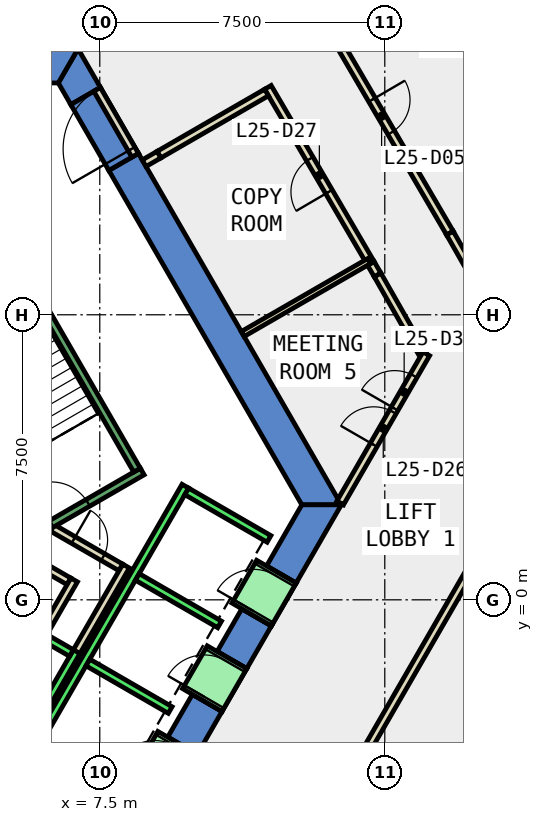
"""IFC4 building model, lengths in metres.
Left out: names, types, materials, properties, quantities, classifications, styles, units other than length and angle.
Written with IfcOpenShell. Run it as: python <this file> out.ifc"""

import sys

from ifc_helpers import new_model, si_unit, direction, frame, frame_2d, origin, place, context, subcontext, project, spatial, polyline, rectangle, outline, extrude, element, fill, save


model = new_model("IFC4")
c1 = context("Model", 3, precision=1e-05, world=origin(), true_north=direction((0.0, 1.0)))
c2 = subcontext(c1, "Body", "Model", "MODEL_VIEW")
j1 = project(units=[si_unit("LENGTHUNIT", "METRE"), si_unit("PLANEANGLEUNIT", "RADIAN")], contexts=[c1])
p1 = place(None, origin())
s1 = spatial("IfcSite", under=j1, at=p1, CompositionType="ELEMENT")
p2 = place(p1, origin())
s2 = spatial("IfcBuilding", under=s1, at=p2, CompositionType="ELEMENT")
p3 = place(p2, frame((0.0, 0.0, 116.0)))
s3 = spatial("IfcBuildingStorey", under=s2, at=p3, CompositionType="ELEMENT", Elevation=116.0)
p4 = place(p3, frame((0.0, 0.0, -0.4)))
e1 = element("IfcWall", 1, at=p4, inside=s3, PredefinedType="SHEAR", context=c2, shape_type="SweptSolid", body=[
    extrude(outline(polyline([(8.517, 11.748), (7.738, 11.298), (12.817, 2.5), (13.856, 2.5), (8.517, 11.748)])), origin(), (0.0, 0.0, 1.0), 4.2),
])
p5 = place(p3, frame((0.0, 0.0, -0.4)))
e2 = element("IfcWall", 2, at=p5, inside=s3, PredefinedType="SHEAR", context=c2, shape_type="SweptSolid", body=[
    extrude(outline(polyline([(6.738, 13.03), (7.517, 13.48), (6.928, 14.5), (6.409, 13.6), (6.738, 13.03)])), origin(), (0.0, 0.0, 1.0), 4.2),
])
p6 = place(p3, frame((0.0, 0.0, 3.6)))
e3 = element("IfcWall", 3, at=p6, inside=s3, PredefinedType="SHEAR", context=c2, shape_type="SweptSolid", body=[
    extrude(outline(polyline([(7.517, 13.48), (6.738, 13.03), (7.738, 11.298), (8.517, 11.748), (7.517, 13.48)])), origin(), (0.0, 0.0, 1.0), 0.2),
])
p7 = place(p3, frame((0.0, 0.0, -0.4)))
e4 = element("IfcWall", 4, at=p7, inside=s3, PredefinedType="SHEAR", context=c2, shape_type="SweptSolid", body=[
    extrude(outline(polyline([(4.55, 14.5), (4.55, 13.6), (6.409, 13.6), (6.928, 14.5), (4.55, 14.5)])), origin(), (0.0, 0.0, 1.0), 4.2),
])
p8 = place(p3, frame((0.0, 0.0, -0.4)))
e5 = element("IfcWall", 5, at=p8, inside=s3, PredefinedType="SHEAR", context=c2, shape_type="SweptSolid", body=[
    extrude(outline(polyline([(10.717, -2.937), (9.938, -2.487), (9.288, -3.613), (10.067, -4.063), (10.717, -2.937)])), origin(), (0.0, 0.0, 1.0), 4.2),
])
p9 = place(p3, frame((0.0, 0.0, -0.4)))
e6 = element("IfcWall", 6, at=p9, inside=s3, PredefinedType="SHEAR", context=c2, shape_type="SweptSolid", body=[
    extrude(outline(polyline([(12.017, -0.686), (11.238, -0.236), (10.588, -1.361), (11.367, -1.811), (12.017, -0.686)])), origin(), (0.0, 0.0, 1.0), 4.2),
])
p10 = place(p3, frame((0.0, 0.0, -0.4)))
e7 = element("IfcWall", 7, at=p10, inside=s3, PredefinedType="SHEAR", context=c2, shape_type="SweptSolid", body=[
    extrude(outline(polyline([(11.888, 0.89), (12.667, 0.44), (13.856, 2.5), (12.817, 2.5), (11.888, 0.89)])), origin(), (0.0, 0.0, 1.0), 4.2),
])
p11 = place(p3, frame((0.0, 0.0, 3.6)))
e8 = element("IfcWall", 8, at=p11, inside=s3, PredefinedType="SHEAR", context=c2, shape_type="SweptSolid", body=[
    extrude(outline(polyline([(10.067, -4.063), (9.288, -3.613), (8.638, -4.739), (9.417, -5.189), (10.067, -4.063)])), origin(), (0.0, 0.0, 1.0), 0.2),
])
p12 = place(p3, frame((0.0, 0.0, 3.6)))
e9 = element("IfcWall", 9, at=p12, inside=s3, PredefinedType="SHEAR", context=c2, shape_type="SweptSolid", body=[
    extrude(outline(polyline([(11.367, -1.811), (10.588, -1.361), (9.938, -2.487), (10.717, -2.937), (11.367, -1.811)])), origin(), (0.0, 0.0, 1.0), 0.2),
])
p13 = place(p3, frame((0.0, 0.0, 3.6)))
e10 = element("IfcWall", 10, at=p13, inside=s3, PredefinedType="SHEAR", context=c2, shape_type="SweptSolid", body=[
    extrude(outline(polyline([(12.667, 0.44), (11.888, 0.89), (11.238, -0.236), (12.017, -0.686), (12.667, 0.44)])), origin(), (0.0, 0.0, 1.0), 0.2),
])
p14 = place(p3, frame((15.993, 6.473, 0.0), z_axis=(0.0, 0.0, 1.0), x_axis=(-0.495159881733, 0.86880187127, 0.0)))
e11 = element("IfcWall", 11, at=p14, inside=s3, PredefinedType="PARTITIONING", context=c2, shape_type="SweptSolid", body=[
    extrude(rectangle(XDim=2.391, YDim=0.2, at=frame_2d((1.195, 0.0))), origin(), (0.0, 0.0, 1.0), 3.8),
])
p15 = place(p3, frame((14.809, 8.55, 0.0), z_axis=(0.0, 0.0, 1.0), x_axis=(-0.50443330283, 0.86345066043, 0.0)))
e12 = element("IfcWall", 12, at=p15, inside=s3, PredefinedType="PARTITIONING", context=c2, shape_type="SweptSolid", body=[
    extrude(rectangle(XDim=0.351, YDim=0.2, at=frame_2d((0.175, 0.0))), origin(), (0.0, 0.0, 1.0), 3.8),
])
p16 = place(p3, frame((14.632, 8.853, 0.0), z_axis=(0.0, 0.0, 1.0), x_axis=(-0.504798859257, 0.863236996249, 0.0)))
e13 = element("IfcWall", 13, at=p16, inside=s3, PredefinedType="PARTITIONING", context=c2, shape_type="SweptSolid", body=[
    extrude(rectangle(XDim=5.365, YDim=0.2, at=frame_2d((2.682, 0.0))), origin(), (0.0, 0.0, 1.0), 3.8),
])
p17 = place(p16, frame((2.182, 0.0, 0.0)))
e14 = element("IfcOpeningElement", 14, at=p17, cuts=e13, PredefinedType="OPENING", context=c2, shape_type="SweptSolid", body=[
    extrude(rectangle(XDim=1.0, YDim=2.1, at=frame_2d((0.5, 1.05))), frame((0.0, 0.11, 0.0), z_axis=(0.0, -1.0, 0.0), x_axis=(1.0, 0.0, 0.0)), (0.0, 0.0, 1.0), 0.22),
])
p18 = place(p3, frame((11.888, 13.348, 0.0), z_axis=(0.0, 0.0, 1.0), x_axis=(-0.865959227195, -0.500114603702, 0.0)))
e15 = element("IfcWall", 15, at=p18, inside=s3, PredefinedType="PARTITIONING", context=c2, shape_type="SweptSolid", body=[
    extrude(rectangle(XDim=3.269, YDim=0.2, at=frame_2d((1.635, 0.0))), origin(), (0.0, 0.0, 1.0), 3.8),
])
p19 = place(p3, frame((13.119, 15.799, 0.0), z_axis=(0.0, 0.0, 1.0), x_axis=(0.504729598075, -0.863277494684, 0.0)))
e16 = element("IfcWall", 16, at=p19, inside=s3, PredefinedType="PARTITIONING", context=c2, shape_type="SweptSolid", body=[
    extrude(rectangle(XDim=7.123, YDim=0.2, at=frame_2d((3.562, 0.0))), origin(), (0.0, 0.0, 1.0), 3.8),
])
p20 = place(p19, frame((3.061, 0.0, 0.0)))
e17 = element("IfcOpeningElement", 17, at=p20, cuts=e16, PredefinedType="OPENING", context=c2, shape_type="SweptSolid", body=[
    extrude(rectangle(XDim=1.0, YDim=2.1, at=frame_2d((0.5, 1.05))), frame((0.0, 0.11, 0.0), z_axis=(0.0, -1.0, 0.0), x_axis=(1.0, 0.0, 0.0)), (0.0, 0.0, 1.0), 0.22),
])
p21 = place(p3, frame((16.714, 9.65, 0.0), z_axis=(0.0, 0.0, 1.0), x_axis=(0.495286549488, -0.868729666753, 0.0)))
e18 = element("IfcWall", 18, at=p21, inside=s3, PredefinedType="PARTITIONING", context=c2, shape_type="SweptSolid", body=[
    extrude(rectangle(XDim=3.487, YDim=0.2, at=frame_2d((1.743, 0.0))), origin(), (0.0, 0.0, 1.0), 3.8),
])
p22 = place(p3, frame((5.499, 1.172, 0.0), z_axis=(0.0, 0.0, 1.0), x_axis=(0.866333505267, -0.499465972466, 0.0)))
e19 = element("IfcWall", 19, at=p22, inside=s3, PredefinedType="PARTITIONING", context=c2, shape_type="SweptSolid", body=[
    extrude(rectangle(XDim=1.374, YDim=0.2, at=frame_2d((0.687, 0.0))), origin(), (0.0, 0.0, 1.0), 3.8),
])
p23 = place(p3, frame((6.826, 0.522, 0.0), z_axis=(0.0, 0.0, 1.0), x_axis=(-0.500016722714, -0.866015748706, 0.0)))
e20 = element("IfcWall", 20, at=p23, inside=s3, PredefinedType="PARTITIONING", context=c2, shape_type="SweptSolid", body=[
    extrude(rectangle(XDim=1.7, YDim=0.2, at=frame_2d((0.85, 0.0))), origin(), (0.0, 0.0, 1.0), 3.8),
])
p24 = place(p3, frame((6.25, 1.894, 0.0), z_axis=(0.0, 0.0, 1.0), x_axis=(0.866043184279, -0.499969202016, 0.0)))
e21 = element("IfcWall", 21, at=p24, inside=s3, PredefinedType="PARTITIONING", context=c2, shape_type="SweptSolid", body=[
    extrude(rectangle(XDim=2.084, YDim=0.2, at=frame_2d((1.042, 0.0))), origin(), (0.0, 0.0, 1.0), 3.8),
])
p25 = place(p24, frame((0.642, 0.0, 0.0)))
e22 = element("IfcOpeningElement", 22, at=p25, cuts=e21, PredefinedType="OPENING", context=c2, shape_type="SweptSolid", body=[
    extrude(rectangle(XDim=0.9, YDim=2.1, at=frame_2d((0.45, 1.05))), frame((0.0, 0.11, 0.0), z_axis=(0.0, -1.0, 0.0), x_axis=(1.0, 0.0, 0.0)), (0.0, 0.0, 1.0), 0.22),
])
p26 = place(p3, frame((8.192, 0.888, 0.0), z_axis=(0.0, 0.0, 1.0), x_axis=(-0.499940625693, -0.866059680843, 0.0)))
e23 = element("IfcWall", 23, at=p26, inside=s3, PredefinedType="PARTITIONING", context=c2, shape_type="SweptSolid", body=[
    extrude(rectangle(XDim=2.68, YDim=0.2, at=frame_2d((1.34, 0.0))), origin(), (0.0, 0.0, 1.0), 3.8),
])
p27 = place(p3, frame((11.261, 6.994, 0.0), z_axis=(0.0, 0.0, 1.0), x_axis=(0.86605248387, 0.499953092981, 0.0)))
e24 = element("IfcWall", 24, at=p27, inside=s3, PredefinedType="PARTITIONING", context=c2, shape_type="SweptSolid", body=[
    extrude(rectangle(XDim=3.848, YDim=0.15, at=frame_2d((1.924, 0.0))), origin(), (0.0, 0.0, 1.0), 3.8),
])
p28 = place(p3, frame((13.827, 2.55, 0.0), z_axis=(0.0, 0.0, 1.0), x_axis=(0.500045913515, 0.865998893981, 0.0)))
e25 = element("IfcWall", 25, at=p28, inside=s3, PredefinedType="PARTITIONING", context=c2, shape_type="SweptSolid", body=[
    extrude(rectangle(XDim=4.53, YDim=0.2, at=frame_2d((2.265, 0.0))), origin(), (0.0, 0.0, 1.0), 3.8),
])
p29 = place(p28, frame((1.765, 0.0, 0.0)))
e26 = element("IfcOpeningElement", 26, at=p29, cuts=e25, PredefinedType="OPENING", context=c2, shape_type="SweptSolid", body=[
    extrude(rectangle(XDim=1.0, YDim=2.1, at=frame_2d((0.5, 1.05))), frame((0.0, 0.11, 0.0), z_axis=(0.0, -1.0, 0.0), x_axis=(1.0, 0.0, 0.0)), (0.0, 0.0, 1.0), 0.22),
])
p30 = place(p28, frame((2.865, 0.0, 0.0)))
e27 = element("IfcOpeningElement", 27, at=p30, cuts=e25, PredefinedType="OPENING", context=c2, shape_type="SweptSolid", body=[
    extrude(rectangle(XDim=1.0, YDim=2.1, at=frame_2d((0.5, 1.05))), frame((0.0, 0.11, 0.0), z_axis=(0.0, -1.0, 0.0), x_axis=(1.0, 0.0, 0.0)), (0.0, 0.0, 1.0), 0.22),
])
p31 = place(p3, frame((18.301, 2.598, 0.0), z_axis=(0.0, 0.0, 1.0), x_axis=(-0.49997732567, -0.866038494419, 0.0)))
e28 = element("IfcWall", 28, at=p31, inside=s3, PredefinedType="PARTITIONING", context=c2, shape_type="SweptSolid", body=[
    extrude(rectangle(XDim=11.0, YDim=0.2, at=frame_2d((5.5, 0.0))), origin(), (0.0, 0.0, 1.0), 3.8),
])
p32 = place(p3, frame((8.43, 11.698, 0.0), z_axis=(0.0, 0.0, 1.0), x_axis=(-0.50002537861, 0.866010750942, 0.0)))
e29 = element("IfcWall", 29, at=p32, inside=s3, PredefinedType="PARTITIONING", context=c2, shape_type="SweptSolid", body=[
    extrude(rectangle(XDim=2.0, YDim=0.2, at=frame_2d((1.0, 0.0))), origin(), (0.0, 0.0, 1.0), 2.4),
])
p33 = place(p32, frame((0.19, 0.0, 0.0)))
e30 = element("IfcOpeningElement", 30, at=p33, cuts=e29, PredefinedType="OPENING", context=c2, shape_type="SweptSolid", body=[
    extrude(rectangle(XDim=1.8, YDim=2.1, at=frame_2d((0.9, 1.05))), frame((0.0, 0.11, 0.0), z_axis=(0.0, -1.0, 0.0), x_axis=(1.0, 0.0, 0.0)), (0.0, 0.0, 1.0), 0.22),
])
p34 = place(p3, frame((9.057, 11.713, 0.0), z_axis=(0.0, 0.0, 1.0), x_axis=(-0.866266849364, -0.49958157061, 0.0)))
e31 = element("IfcWall", 31, at=p34, inside=s3, PredefinedType="PARTITIONING", context=c2, shape_type="SweptSolid", body=[
    extrude(rectangle(XDim=0.45, YDim=0.2, at=frame_2d((0.225, 0.0))), origin(), (0.0, 0.0, 1.0), 2.4),
])
p35 = place(p3, frame((5.492, -3.788, 0.0), z_axis=(0.0, 0.0, 1.0), x_axis=(0.500011755427, 0.866018616679, 0.0)))
e32 = element("IfcWall", 32, at=p35, inside=s3, PredefinedType="STANDARD", context=c2, shape_type="SweptSolid", body=[
    extrude(rectangle(XDim=2.8, YDim=0.2, at=frame_2d((1.4, 0.0))), origin(), (0.0, 0.0, 1.0), 3.8),
])
p36 = place(p3, frame((4.677, -0.2, 0.0), z_axis=(0.0, 0.0, 1.0), x_axis=(0.865973769406, -0.500089422704, 0.0)))
e33 = element("IfcWall", 33, at=p36, inside=s3, PredefinedType="STANDARD", context=c2, shape_type="SweptSolid", body=[
    extrude(rectangle(XDim=2.399, YDim=0.2, at=frame_2d((1.2, 0.0))), origin(), (0.0, 0.0, 1.0), 3.8),
])
p37 = place(p3, frame((4.451, -6.19, 0.0), z_axis=(0.0, 0.0, 1.0), x_axis=(0.50000090737, 0.866024879913, 0.0)))
e34 = element("IfcWall", 34, at=p37, inside=s3, PredefinedType="STANDARD", context=c2, shape_type="SweptSolid", body=[
    extrude(rectangle(XDim=10.6, YDim=0.2, at=frame_2d((5.3, 0.0))), origin(), (0.0, 0.0, 1.0), 3.8),
])
for number, where, z_axis, x_axis in (
    (35, (7.188, -1.65, 0.0), (0.0, 0.0, 1.0), (0.866, -0.5, 0.0)),
    (36, (8.488, 0.602, 0.0), (0.0, 0.0, 1.0), (0.866, -0.5, 0.0)),
):
    element("IfcWall", number, at=place(p3, frame(where, z_axis=z_axis, x_axis=x_axis)), inside=s3, PredefinedType="STANDARD", context=c2, shape_type="SweptSolid", body=[
        extrude(rectangle(XDim=2.5, YDim=0.2, at=frame_2d((1.25, 0.0))), origin(), (0.0, 0.0, 1.0), 3.8),
    ])
p38 = place(p3, frame((9.788, 2.853, 0.0), z_axis=(0.0, 0.0, 1.0), x_axis=(0.865998541277, -0.500046524342, 0.0)))
e37 = element("IfcWall", 37, at=p38, inside=s3, PredefinedType="STANDARD", context=c2, shape_type="SweptSolid", body=[
    extrude(rectangle(XDim=2.5, YDim=0.2, at=frame_2d((1.25, 0.0))), origin(), (0.0, 0.0, 1.0), 3.8),
])
p39 = place(p3, frame((8.898, -4.889, 0.0), z_axis=(0.0, 0.0, 1.0), x_axis=(0.500036693733, 0.866004217611, 0.0)))
e38 = element("IfcWall", 38, at=p39, inside=s3, PredefinedType="STANDARD", context=c2, shape_type="SweptSolid", body=[
    extrude(rectangle(XDim=1.3, YDim=1.2, at=frame_2d((0.65, 0.0))), origin(), (0.0, 0.0, 1.0), 2.4),
])
p40 = place(p39, frame((0.1, 0.0, 0.0)))
e39 = element("IfcOpeningElement", 39, at=p40, cuts=e38, PredefinedType="OPENING", context=c2, shape_type="SweptSolid", body=[
    extrude(rectangle(XDim=1.1, YDim=2.3, at=frame_2d((0.55, 1.15))), frame((0.0, 0.61, 0.0), z_axis=(0.0, -1.0, 0.0), x_axis=(1.0, 0.0, 0.0)), (0.0, 0.0, 1.0), 1.22),
])
p41 = place(p3, frame((10.198, -2.637, 0.0), z_axis=(0.0, 0.0, 1.0), x_axis=(0.49989585183, 0.866085525409, 0.0)))
e40 = element("IfcWall", 40, at=p41, inside=s3, PredefinedType="STANDARD", context=c2, shape_type="SweptSolid", body=[
    extrude(rectangle(XDim=1.3, YDim=1.2, at=frame_2d((0.65, 0.0))), origin(), (0.0, 0.0, 1.0), 2.4),
])
p42 = place(p41, frame((0.1, 0.0, 0.0)))
e41 = element("IfcOpeningElement", 41, at=p42, cuts=e40, PredefinedType="OPENING", context=c2, shape_type="SweptSolid", body=[
    extrude(rectangle(XDim=1.1, YDim=2.3, at=frame_2d((0.55, 1.15))), frame((0.0, 0.61, 0.0), z_axis=(0.0, -1.0, 0.0), x_axis=(1.0, 0.0, 0.0)), (0.0, 0.0, 1.0), 1.22),
])
p43 = place(p3, frame((11.498, -0.385, 0.0), z_axis=(0.0, 0.0, 1.0), x_axis=(0.500221244143, 0.865897630733, 0.0)))
e42 = element("IfcWall", 42, at=p43, inside=s3, PredefinedType="STANDARD", context=c2, shape_type="SweptSolid", body=[
    extrude(rectangle(XDim=1.299, YDim=1.2, at=frame_2d((0.65, 0.0))), origin(), (0.0, 0.0, 1.0), 2.4),
])
p44 = place(p43, frame((0.1, 0.0, 0.0)))
e43 = element("IfcOpeningElement", 43, at=p44, cuts=e42, PredefinedType="OPENING", context=c2, shape_type="SweptSolid", body=[
    extrude(rectangle(XDim=1.1, YDim=2.3, at=frame_2d((0.55, 1.15))), frame((0.0, 0.61, 0.0), z_axis=(0.0, -1.0, 0.0), x_axis=(1.0, 0.0, 0.0)), (0.0, 0.0, 1.0), 1.22),
])
p45 = place(p3, frame((4.806, 1.176, 0.0), z_axis=(0.0, 0.0, 1.0), x_axis=(0.866059941101, 0.499940174841, 0.0)))
e44 = element("IfcWall", 44, at=p45, inside=s3, PredefinedType="STANDARD", context=c2, shape_type="SweptSolid", body=[
    extrude(rectangle(XDim=4.4, YDim=0.2, at=frame_2d((2.2, 0.0))), origin(), (0.0, 0.0, 1.0), 3.8),
])
p46 = place(p45, frame((1.65, 0.0, 0.0)))
e45 = element("IfcOpeningElement", 45, at=p46, cuts=e44, PredefinedType="OPENING", context=c2, shape_type="SweptSolid", body=[
    extrude(rectangle(XDim=1.1, YDim=2.2, at=frame_2d((0.55, 1.1))), frame((0.0, 0.11, 0.0), z_axis=(0.0, -1.0, 0.0), x_axis=(1.0, 0.0, 0.0)), (0.0, 0.0, 1.0), 0.22),
])
p47 = place(p3, frame((8.48, 3.412, 0.0), z_axis=(0.0, 0.0, 1.0), x_axis=(-0.499978703459, 0.866037698999, 0.0)))
e46 = element("IfcWall", 46, at=p47, inside=s3, PredefinedType="STANDARD", context=c2, shape_type="SweptSolid", body=[
    extrude(rectangle(XDim=6.9, YDim=0.2, at=frame_2d((3.45, 0.0))), origin(), (0.0, 0.0, 1.0), 3.8),
])
p48 = place(p20, origin())
e47 = element("IfcDoor", 47, at=p48, inside=s3, OperationType="SINGLE_SWING_RIGHT", PredefinedType="DOOR", context=c2, shape_type="SweptSolid", body=[
    extrude(rectangle(XDim=1.0, YDim=2.1, at=frame_2d((0.5, 1.05))), frame((0.0, 0.025, 0.0), z_axis=(0.0, -1.0, 0.0), x_axis=(1.0, 0.0, 0.0)), (0.0, 0.0, 1.0), 0.05),
])
fill(e17, e47)
p49 = place(p29, origin())
e48 = element("IfcDoor", 48, at=p49, inside=s3, OperationType="SINGLE_SWING_LEFT", PredefinedType="DOOR", context=c2, shape_type="SweptSolid", body=[
    extrude(rectangle(XDim=1.0, YDim=2.1, at=frame_2d((0.5, 1.05))), frame((0.0, 0.025, 0.0), z_axis=(0.0, -1.0, 0.0), x_axis=(1.0, 0.0, 0.0)), (0.0, 0.0, 1.0), 0.05),
])
fill(e26, e48)
p50 = place(p17, origin())
e49 = element("IfcDoor", 49, at=p50, inside=s3, OperationType="SINGLE_SWING_LEFT", PredefinedType="DOOR", context=c2, shape_type="SweptSolid", body=[
    extrude(rectangle(XDim=1.0, YDim=2.1, at=frame_2d((0.5, 1.05))), frame((0.0, 0.025, 0.0), z_axis=(0.0, -1.0, 0.0), x_axis=(1.0, 0.0, 0.0)), (0.0, 0.0, 1.0), 0.05),
])
fill(e14, e49)
p51 = place(p25, origin())
e50 = element("IfcDoor", 50, at=p51, inside=s3, OperationType="SINGLE_SWING_LEFT", PredefinedType="DOOR", context=c2, shape_type="SweptSolid", body=[
    extrude(rectangle(XDim=0.9, YDim=2.1, at=frame_2d((0.45, 1.05))), frame((0.0, 0.025, 0.0), z_axis=(0.0, -1.0, 0.0), x_axis=(1.0, 0.0, 0.0)), (0.0, 0.0, 1.0), 0.05),
])
fill(e22, e50)
p52 = place(p30, origin())
e51 = element("IfcDoor", 51, at=p52, inside=s3, OperationType="SINGLE_SWING_RIGHT", PredefinedType="DOOR", context=c2, shape_type="SweptSolid", body=[
    extrude(rectangle(XDim=1.0, YDim=2.1, at=frame_2d((0.5, 1.05))), frame((0.0, 0.025, 0.0), z_axis=(0.0, -1.0, 0.0), x_axis=(1.0, 0.0, 0.0)), (0.0, 0.0, 1.0), 0.05),
])
fill(e27, e51)
p53 = place(p33, origin())
e52 = element("IfcDoor", 52, at=p53, inside=s3, OperationType="DOUBLE_DOOR_SINGLE_SWING", PredefinedType="DOOR", context=c2, shape_type="SweptSolid", body=[
    extrude(rectangle(XDim=1.8, YDim=2.1, at=frame_2d((0.9, 1.05))), frame((0.0, 0.025, 0.0), z_axis=(0.0, -1.0, 0.0), x_axis=(1.0, 0.0, 0.0)), (0.0, 0.0, 1.0), 0.05),
])
fill(e30, e52)
p54 = place(p42, origin())
e53 = element("IfcDoor", 53, at=p54, inside=s3, OperationType="SLIDING_TO_LEFT", PredefinedType="DOOR", context=c2, shape_type="SweptSolid", body=[
    extrude(rectangle(XDim=1.1, YDim=2.3, at=frame_2d((0.55, 1.15))), frame((0.0, 0.025, 0.0), z_axis=(0.0, -1.0, 0.0), x_axis=(1.0, 0.0, 0.0)), (0.0, 0.0, 1.0), 0.05),
])
fill(e41, e53)
p55 = place(p44, origin())
e54 = element("IfcDoor", 54, at=p55, inside=s3, OperationType="SLIDING_TO_LEFT", PredefinedType="DOOR", context=c2, shape_type="SweptSolid", body=[
    extrude(rectangle(XDim=1.1, YDim=2.3, at=frame_2d((0.55, 1.15))), frame((0.0, 0.025, 0.0), z_axis=(0.0, -1.0, 0.0), x_axis=(1.0, 0.0, 0.0)), (0.0, 0.0, 1.0), 0.05),
])
fill(e43, e54)
p56 = place(p46, origin())
e55 = element("IfcDoor", 55, at=p56, inside=s3, OperationType="SINGLE_SWING_LEFT", PredefinedType="DOOR", context=c2, shape_type="SweptSolid", body=[
    extrude(rectangle(XDim=1.1, YDim=2.2, at=frame_2d((0.55, 1.1))), frame((0.0, 0.025, 0.0), z_axis=(0.0, -1.0, 0.0), x_axis=(1.0, 0.0, 0.0)), (0.0, 0.0, 1.0), 0.05),
])
fill(e45, e55)
save(model, sys.argv[1])
